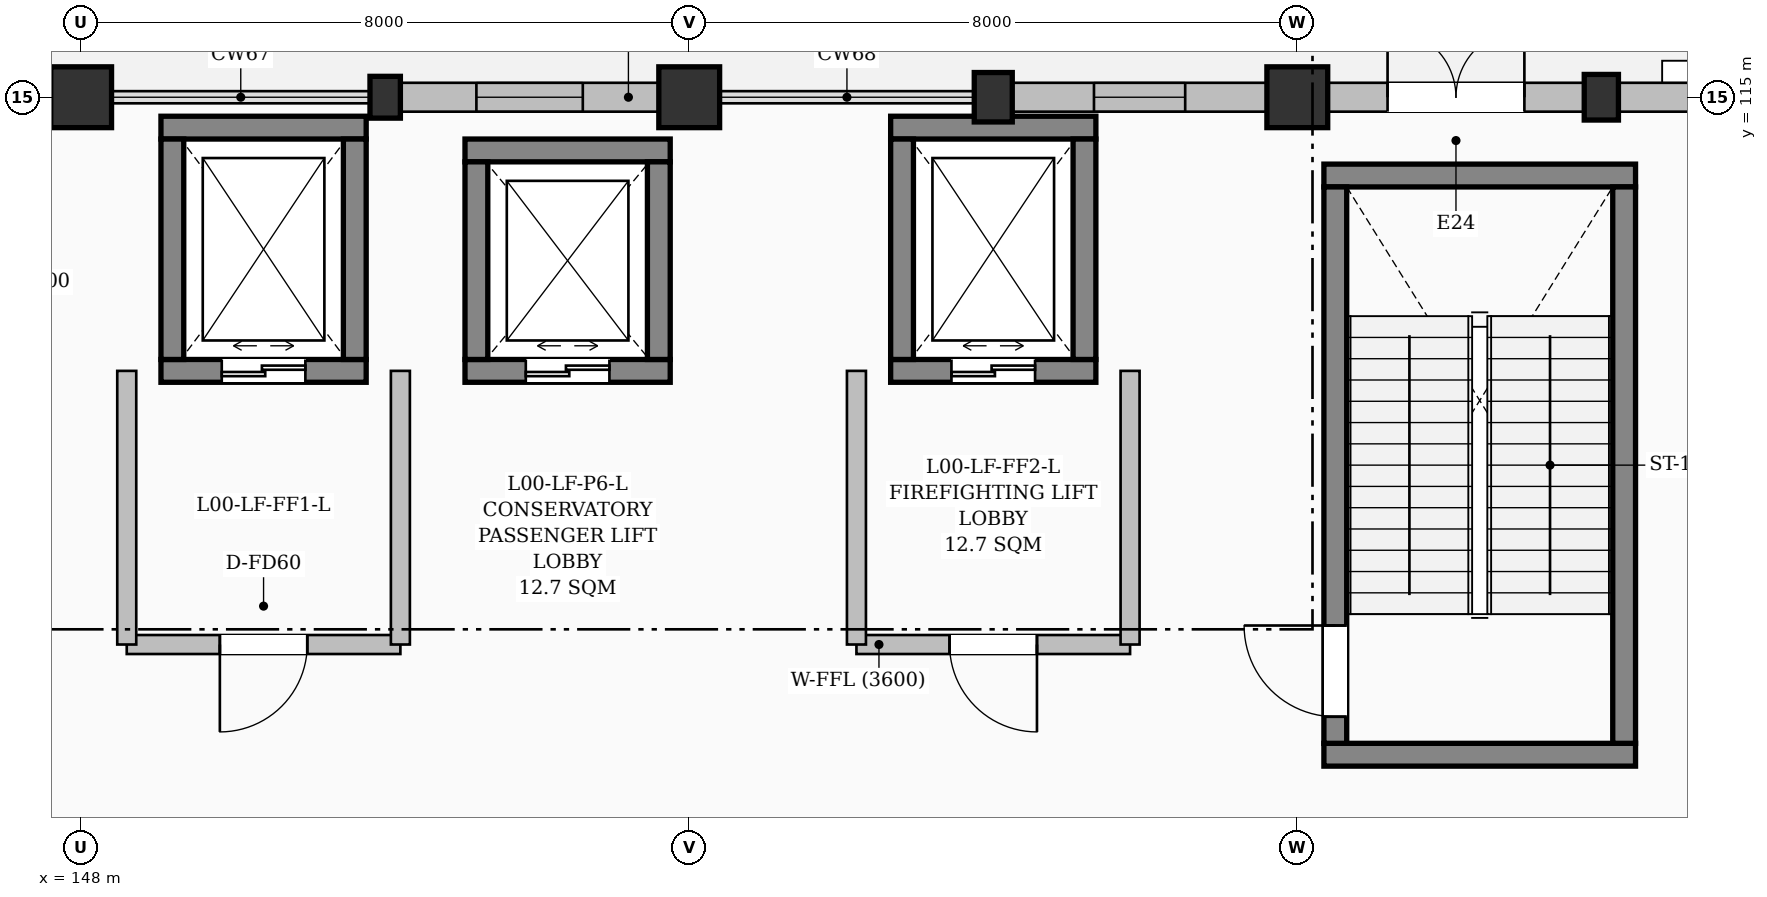
"""IFC4 building model, lengths in metres.
Left out: names, types, materials, properties, quantities, classifications, styles, units other than length and angle.
Written with IfcOpenShell. Run it as: python <this file> out.ifc"""

import sys

from ifc_helpers import new_model, si_unit, direction, frame, frame_2d, origin, origin_2d, place, context, subcontext, project, spatial, rectangle, extrude, element, fill, save


model = new_model("IFC4")
c1 = context("Model", 3, precision=1e-05, world=origin(), true_north=direction((0.0, 1.0)))
c2 = subcontext(c1, "Body", "Model", "MODEL_VIEW")
j1 = project(units=[si_unit("LENGTHUNIT", "METRE"), si_unit("PLANEANGLEUNIT", "RADIAN")], contexts=[c1])
p1 = place(None, origin())
s1 = spatial("IfcSite", under=j1, at=p1, CompositionType="ELEMENT")
p2 = place(p1, origin())
s2 = spatial("IfcBuilding", under=s1, at=p2, CompositionType="ELEMENT")
p3 = place(p2, origin())
s3 = spatial("IfcBuildingStorey", under=s2, at=p3, CompositionType="ELEMENT", Elevation=0.0)
p4 = place(p3, frame((148.0, 115.0, 0.0), z_axis=(0.0, 0.0, 1.0), x_axis=(1.0, 0.0, 0.0)))
e1 = element("IfcColumn", 1, at=p4, inside=s3, PredefinedType="COLUMN", context=c2, shape_type="SweptSolid", body=[
    extrude(rectangle(XDim=0.8, YDim=0.8, at=origin_2d()), origin(), (0.0, 0.0, 1.0), 4.8),
])
p5 = place(p3, frame((152.0, 115.0, 0.0), z_axis=(0.0, 0.0, 1.0), x_axis=(1.0, 0.0, 0.0)))
e2 = element("IfcColumn", 2, at=p5, inside=s3, PredefinedType="PILASTER", context=c2, shape_type="SweptSolid", body=[
    extrude(rectangle(XDim=0.4, YDim=0.55, at=origin_2d()), origin(), (0.0, 0.0, 1.0), 4.8),
])
p6 = place(p3, frame((156.0, 115.0, 0.0), z_axis=(0.0, 0.0, 1.0), x_axis=(1.0, 0.0, 0.0)))
e3 = element("IfcColumn", 3, at=p6, inside=s3, PredefinedType="COLUMN", context=c2, shape_type="SweptSolid", body=[
    extrude(rectangle(XDim=0.8, YDim=0.8, at=origin_2d()), origin(), (0.0, 0.0, 1.0), 4.8),
])
p7 = place(p3, frame((160.0, 115.0, 0.0), z_axis=(0.0, 0.0, 1.0), x_axis=(1.0, 0.0, 0.0)))
e4 = element("IfcColumn", 4, at=p7, inside=s3, PredefinedType="PILASTER", context=c2, shape_type="SweptSolid", body=[
    extrude(rectangle(XDim=0.5, YDim=0.65, at=origin_2d()), origin(), (0.0, 0.0, 1.0), 4.8),
])
p8 = place(p3, frame((164.0, 115.0, 0.0), z_axis=(0.0, 0.0, 1.0), x_axis=(1.0, 0.0, 0.0)))
e5 = element("IfcColumn", 5, at=p8, inside=s3, PredefinedType="COLUMN", context=c2, shape_type="SweptSolid", body=[
    extrude(rectangle(XDim=0.8, YDim=0.8, at=origin_2d()), origin(), (0.0, 0.0, 1.0), 4.8),
])
p9 = place(p3, frame((168.0, 115.0, 0.0), z_axis=(0.0, 0.0, 1.0), x_axis=(1.0, 0.0, 0.0)))
e6 = element("IfcColumn", 6, at=p9, inside=s3, PredefinedType="PILASTER", context=c2, shape_type="SweptSolid", body=[
    extrude(rectangle(XDim=0.45, YDim=0.6, at=origin_2d()), origin(), (0.0, 0.0, 1.0), 4.8),
])
p10 = place(p3, frame((152.2, 115.0, 0.0), z_axis=(0.0, 0.0, 1.0), x_axis=(1.0, 0.0, 0.0)))
e7 = element("IfcWall", 7, at=p10, inside=s3, PredefinedType="SOLIDWALL", context=c2, shape_type="SweptSolid", body=[
    extrude(rectangle(XDim=3.4, YDim=0.38, at=frame_2d((1.7, 0.0))), origin(), (0.0, 0.0, 1.0), 3.985),
])
p11 = place(p10, frame((1.0, 0.0, 0.95)))
e8 = element("IfcOpeningElement", 8, at=p11, cuts=e7, PredefinedType="OPENING", context=c2, shape_type="SweptSolid", body=[
    extrude(rectangle(XDim=1.4, YDim=1.8, at=frame_2d((0.7, 0.9))), frame((0.0, 0.2, 0.0), z_axis=(0.0, -1.0, 0.0), x_axis=(1.0, 0.0, 0.0)), (0.0, 0.0, 1.0), 0.4),
])
p12 = place(p3, frame((160.25, 115.0, 0.0), z_axis=(0.0, 0.0, 1.0), x_axis=(1.0, 0.0, 0.0)))
e9 = element("IfcWall", 9, at=p12, inside=s3, PredefinedType="SOLIDWALL", context=c2, shape_type="SweptSolid", body=[
    extrude(rectangle(XDim=3.35, YDim=0.38, at=frame_2d((1.675, 0.0))), origin(), (0.0, 0.0, 1.0), 3.935),
])
p13 = place(p12, frame((1.075, 0.0, 0.95)))
e10 = element("IfcOpeningElement", 10, at=p13, cuts=e9, PredefinedType="OPENING", context=c2, shape_type="SweptSolid", body=[
    extrude(rectangle(XDim=1.2, YDim=1.5, at=frame_2d((0.6, 0.75))), frame((0.0, 0.2, 0.0), z_axis=(0.0, -1.0, 0.0), x_axis=(1.0, 0.0, 0.0)), (0.0, 0.0, 1.0), 0.4),
])
p14 = place(p3, frame((164.4, 115.0, 0.0), z_axis=(0.0, 0.0, 1.0), x_axis=(1.0, 0.0, 0.0)))
e11 = element("IfcWall", 11, at=p14, inside=s3, PredefinedType="SOLIDWALL", context=c2, shape_type="SweptSolid", body=[
    extrude(rectangle(XDim=3.375, YDim=0.38, at=frame_2d((1.688, 0.0))), origin(), (0.0, 0.0, 1.0), 4.235),
])
p15 = place(p14, frame((0.788, 0.0, 0.0)))
e12 = element("IfcOpeningElement", 12, at=p15, cuts=e11, PredefinedType="OPENING", context=c2, shape_type="SweptSolid", body=[
    extrude(rectangle(XDim=1.8, YDim=2.25, at=frame_2d((0.9, 1.125))), frame((0.0, 0.2, 0.0), z_axis=(0.0, -1.0, 0.0), x_axis=(1.0, 0.0, 0.0)), (0.0, 0.0, 1.0), 0.4),
])
p16 = place(p3, frame((168.225, 115.0, 0.0), z_axis=(0.0, 0.0, 1.0), x_axis=(1.0, 0.0, 0.0)))
e13 = element("IfcWall", 13, at=p16, inside=s3, PredefinedType="SOLIDWALL", context=c2, shape_type="SweptSolid", body=[
    extrude(rectangle(XDim=3.375, YDim=0.38, at=frame_2d((1.688, 0.0))), origin(), (0.0, 0.0, 1.0), 4.235),
])
p17 = place(p16, frame((1.038, 0.0, 0.95)))
e14 = element("IfcOpeningElement", 14, at=p17, cuts=e13, PredefinedType="OPENING", context=c2, shape_type="SweptSolid", body=[
    extrude(rectangle(XDim=1.3, YDim=1.4, at=frame_2d((0.65, 0.7))), frame((0.0, 0.2, 0.0), z_axis=(0.0, -1.0, 0.0), x_axis=(1.0, 0.0, 0.0)), (0.0, 0.0, 1.0), 0.4),
])
for number, where, z_axis, x_axis in (
    (15, (164.35, 106.35, 0.0), (0.0, 0.0, 1.0), (1.0, 0.0, 0.0)),
    (16, (168.45, 113.97, 0.0), (0.0, 0.0, 1.0), (-1.0, 0.0, 0.0)),
):
    element("IfcWall", number, at=place(p3, frame(where, z_axis=z_axis, x_axis=x_axis)), inside=s3, PredefinedType="SHEAR", context=c2, shape_type="SweptSolid", body=[
        extrude(rectangle(XDim=4.1, YDim=0.3, at=frame_2d((2.05, 0.0))), origin(), (0.0, 0.0, 1.0), 4.55),
    ])
p18 = place(p3, frame((164.5, 106.5, 0.0), z_axis=(0.0, 0.0, 1.0), x_axis=(0.0, 1.0, 0.0)))
e17 = element("IfcWall", 17, at=p18, inside=s3, PredefinedType="SHEAR", context=c2, shape_type="SweptSolid", body=[
    extrude(rectangle(XDim=7.32, YDim=0.3, at=frame_2d((3.66, 0.0))), origin(), (0.0, 0.0, 1.0), 4.55),
])
p19 = place(p18, frame((0.35, 0.0, 0.0)))
e18 = element("IfcOpeningElement", 18, at=p19, cuts=e17, PredefinedType="OPENING", context=c2, shape_type="SweptSolid", body=[
    extrude(rectangle(XDim=1.2, YDim=2.15, at=frame_2d((0.6, 1.075))), frame((0.0, 0.16, 0.0), z_axis=(0.0, -1.0, 0.0), x_axis=(1.0, 0.0, 0.0)), (0.0, 0.0, 1.0), 0.32),
])
p20 = place(p3, frame((168.3, 113.82, 0.0), z_axis=(0.0, 0.0, 1.0), x_axis=(0.0, -1.0, 0.0)))
e19 = element("IfcWall", 19, at=p20, inside=s3, PredefinedType="SHEAR", context=c2, shape_type="SweptSolid", body=[
    extrude(rectangle(XDim=7.32, YDim=0.3, at=frame_2d((3.66, 0.0))), origin(), (0.0, 0.0, 1.0), 4.55),
])
p21 = place(p3, frame((149.05, 111.4, 0.0), z_axis=(0.0, 0.0, 1.0), x_axis=(1.0, 0.0, 0.0)))
e20 = element("IfcWall", 20, at=p21, inside=s3, PredefinedType="SHEAR", context=c2, shape_type="SweptSolid", body=[
    extrude(rectangle(XDim=2.7, YDim=0.3, at=frame_2d((1.35, 0.0))), origin(), (0.0, 0.0, 1.0), 4.55),
])
p22 = place(p21, frame((0.8, 0.0, 0.0)))
e21 = element("IfcOpeningElement", 21, at=p22, cuts=e20, PredefinedType="OPENING", context=c2, shape_type="SweptSolid", body=[
    extrude(rectangle(XDim=1.1, YDim=2.15, at=frame_2d((0.55, 1.075))), frame((0.0, 0.16, 0.0), z_axis=(0.0, -1.0, 0.0), x_axis=(1.0, 0.0, 0.0)), (0.0, 0.0, 1.0), 0.32),
])
p23 = place(p3, frame((151.75, 114.6, 0.0), z_axis=(0.0, 0.0, 1.0), x_axis=(-1.0, 0.0, 0.0)))
e22 = element("IfcWall", 22, at=p23, inside=s3, PredefinedType="SHEAR", context=c2, shape_type="SweptSolid", body=[
    extrude(rectangle(XDim=2.7, YDim=0.3, at=frame_2d((1.35, 0.0))), origin(), (0.0, 0.0, 1.0), 4.55),
])
for number, where, z_axis, x_axis in (
    (23, (149.2, 111.55, 0.0), (0.0, 0.0, 1.0), (0.0, 1.0, 0.0)),
    (24, (151.6, 114.45, 0.0), (0.0, 0.0, 1.0), (0.0, -1.0, 0.0)),
):
    element("IfcWall", number, at=place(p3, frame(where, z_axis=z_axis, x_axis=x_axis)), inside=s3, PredefinedType="SHEAR", context=c2, shape_type="SweptSolid", body=[
        extrude(rectangle(XDim=2.9, YDim=0.3, at=frame_2d((1.45, 0.0))), origin(), (0.0, 0.0, 1.0), 4.55),
    ])
p24 = place(p3, frame((152.2, 107.8, 0.0), z_axis=(0.0, 0.0, 1.0), x_axis=(-1.0, 0.0, 0.0)))
e25 = element("IfcWall", 25, at=p24, inside=s3, PredefinedType="SOLIDWALL", context=c2, shape_type="SweptSolid", body=[
    extrude(rectangle(XDim=3.6, YDim=0.25, at=frame_2d((1.8, 0.0))), origin(), (0.0, 0.0, 1.0), 4.55),
])
p25 = place(p24, frame((1.225, 0.0, 0.0)))
e26 = element("IfcOpeningElement", 26, at=p25, cuts=e25, PredefinedType="OPENING", context=c2, shape_type="SweptSolid", body=[
    extrude(rectangle(XDim=1.15, YDim=2.15, at=frame_2d((0.575, 1.075))), frame((0.0, 0.135, 0.0), z_axis=(0.0, -1.0, 0.0), x_axis=(1.0, 0.0, 0.0)), (0.0, 0.0, 1.0), 0.27),
])
for number, where, z_axis, x_axis in (
    (27, (148.6, 107.8, 0.0), (0.0, 0.0, 1.0), (0.0, 1.0, 0.0)),
    (28, (152.2, 111.4, 0.0), (0.0, 0.0, 1.0), (0.0, -1.0, 0.0)),
):
    element("IfcWall", number, at=place(p3, frame(where, z_axis=z_axis, x_axis=x_axis)), inside=s3, PredefinedType="SOLIDWALL", context=c2, shape_type="SweptSolid", body=[
        extrude(rectangle(XDim=3.6, YDim=0.25, at=frame_2d((1.8, 0.0))), origin(), (0.0, 0.0, 1.0), 4.55),
    ])
p26 = place(p3, frame((158.65, 111.4, 0.0), z_axis=(0.0, 0.0, 1.0), x_axis=(1.0, 0.0, 0.0)))
e29 = element("IfcWall", 29, at=p26, inside=s3, PredefinedType="SHEAR", context=c2, shape_type="SweptSolid", body=[
    extrude(rectangle(XDim=2.7, YDim=0.3, at=frame_2d((1.35, 0.0))), origin(), (0.0, 0.0, 1.0), 4.55),
])
p27 = place(p26, frame((0.8, 0.0, 0.0)))
e30 = element("IfcOpeningElement", 30, at=p27, cuts=e29, PredefinedType="OPENING", context=c2, shape_type="SweptSolid", body=[
    extrude(rectangle(XDim=1.1, YDim=2.15, at=frame_2d((0.55, 1.075))), frame((0.0, 0.16, 0.0), z_axis=(0.0, -1.0, 0.0), x_axis=(1.0, 0.0, 0.0)), (0.0, 0.0, 1.0), 0.32),
])
p28 = place(p3, frame((161.35, 114.6, 0.0), z_axis=(0.0, 0.0, 1.0), x_axis=(-1.0, 0.0, 0.0)))
e31 = element("IfcWall", 31, at=p28, inside=s3, PredefinedType="SHEAR", context=c2, shape_type="SweptSolid", body=[
    extrude(rectangle(XDim=2.7, YDim=0.3, at=frame_2d((1.35, 0.0))), origin(), (0.0, 0.0, 1.0), 4.55),
])
for number, where, z_axis, x_axis in (
    (32, (158.8, 111.55, 0.0), (0.0, 0.0, 1.0), (0.0, 1.0, 0.0)),
    (33, (161.2, 114.45, 0.0), (0.0, 0.0, 1.0), (0.0, -1.0, 0.0)),
):
    element("IfcWall", number, at=place(p3, frame(where, z_axis=z_axis, x_axis=x_axis)), inside=s3, PredefinedType="SHEAR", context=c2, shape_type="SweptSolid", body=[
        extrude(rectangle(XDim=2.9, YDim=0.3, at=frame_2d((1.45, 0.0))), origin(), (0.0, 0.0, 1.0), 4.55),
    ])
p29 = place(p3, frame((161.8, 107.8, 0.0), z_axis=(0.0, 0.0, 1.0), x_axis=(-1.0, 0.0, 0.0)))
e34 = element("IfcWall", 34, at=p29, inside=s3, PredefinedType="SOLIDWALL", context=c2, shape_type="SweptSolid", body=[
    extrude(rectangle(XDim=3.6, YDim=0.25, at=frame_2d((1.8, 0.0))), origin(), (0.0, 0.0, 1.0), 4.55),
])
p30 = place(p29, frame((1.225, 0.0, 0.0)))
e35 = element("IfcOpeningElement", 35, at=p30, cuts=e34, PredefinedType="OPENING", context=c2, shape_type="SweptSolid", body=[
    extrude(rectangle(XDim=1.15, YDim=2.15, at=frame_2d((0.575, 1.075))), frame((0.0, 0.135, 0.0), z_axis=(0.0, -1.0, 0.0), x_axis=(1.0, 0.0, 0.0)), (0.0, 0.0, 1.0), 0.27),
])
for number, where, z_axis, x_axis in (
    (36, (158.2, 107.8, 0.0), (0.0, 0.0, 1.0), (0.0, 1.0, 0.0)),
    (37, (161.8, 111.4, 0.0), (0.0, 0.0, 1.0), (0.0, -1.0, 0.0)),
):
    element("IfcWall", number, at=place(p3, frame(where, z_axis=z_axis, x_axis=x_axis)), inside=s3, PredefinedType="SOLIDWALL", context=c2, shape_type="SweptSolid", body=[
        extrude(rectangle(XDim=3.6, YDim=0.25, at=frame_2d((1.8, 0.0))), origin(), (0.0, 0.0, 1.0), 4.55),
    ])
p31 = place(p3, frame((153.05, 111.4, 0.0), z_axis=(0.0, 0.0, 1.0), x_axis=(1.0, 0.0, 0.0)))
e38 = element("IfcWall", 38, at=p31, inside=s3, PredefinedType="SHEAR", context=c2, shape_type="SweptSolid", body=[
    extrude(rectangle(XDim=2.7, YDim=0.3, at=frame_2d((1.35, 0.0))), origin(), (0.0, 0.0, 1.0), 4.55),
])
p32 = place(p31, frame((0.8, 0.0, 0.0)))
e39 = element("IfcOpeningElement", 39, at=p32, cuts=e38, PredefinedType="OPENING", context=c2, shape_type="SweptSolid", body=[
    extrude(rectangle(XDim=1.1, YDim=2.15, at=frame_2d((0.55, 1.075))), frame((0.0, 0.16, 0.0), z_axis=(0.0, -1.0, 0.0), x_axis=(1.0, 0.0, 0.0)), (0.0, 0.0, 1.0), 0.32),
])
p33 = place(p3, frame((155.75, 114.3, 0.0), z_axis=(0.0, 0.0, 1.0), x_axis=(-1.0, 0.0, 0.0)))
e40 = element("IfcWall", 40, at=p33, inside=s3, PredefinedType="SHEAR", context=c2, shape_type="SweptSolid", body=[
    extrude(rectangle(XDim=2.7, YDim=0.3, at=frame_2d((1.35, 0.0))), origin(), (0.0, 0.0, 1.0), 4.55),
])
for number, where, z_axis, x_axis in (
    (41, (153.2, 111.55, 0.0), (0.0, 0.0, 1.0), (0.0, 1.0, 0.0)),
    (42, (155.6, 114.15, 0.0), (0.0, 0.0, 1.0), (0.0, -1.0, 0.0)),
):
    element("IfcWall", number, at=place(p3, frame(where, z_axis=z_axis, x_axis=x_axis)), inside=s3, PredefinedType="SHEAR", context=c2, shape_type="SweptSolid", body=[
        extrude(rectangle(XDim=2.6, YDim=0.3, at=frame_2d((1.3, 0.0))), origin(), (0.0, 0.0, 1.0), 4.55),
    ])
p34 = place(p11, origin())
e43 = element("IfcWindow", 43, at=p34, inside=s3, PartitioningType="DOUBLE_PANEL_VERTICAL", PredefinedType="WINDOW", context=c2, shape_type="SweptSolid", body=[
    extrude(rectangle(XDim=1.4, YDim=1.8, at=frame_2d((0.7, 0.9))), frame((0.0, 0.03, 0.0), z_axis=(0.0, -1.0, 0.0), x_axis=(1.0, 0.0, 0.0)), (0.0, 0.0, 1.0), 0.06),
])
fill(e8, e43)
p35 = place(p13, origin())
e44 = element("IfcWindow", 44, at=p35, inside=s3, PartitioningType="SINGLE_PANEL", PredefinedType="WINDOW", context=c2, shape_type="SweptSolid", body=[
    extrude(rectangle(XDim=1.2, YDim=1.5, at=frame_2d((0.6, 0.75))), frame((0.0, 0.03, 0.0), z_axis=(0.0, -1.0, 0.0), x_axis=(1.0, 0.0, 0.0)), (0.0, 0.0, 1.0), 0.06),
])
fill(e10, e44)
p36 = place(p15, origin())
e45 = element("IfcDoor", 45, at=p36, inside=s3, OperationType="DOUBLE_DOOR_SINGLE_SWING", PredefinedType="DOOR", context=c2, shape_type="SweptSolid", body=[
    extrude(rectangle(XDim=1.8, YDim=2.25, at=frame_2d((0.9, 1.125))), frame((0.0, 0.025, 0.0), z_axis=(0.0, -1.0, 0.0), x_axis=(1.0, 0.0, 0.0)), (0.0, 0.0, 1.0), 0.05),
])
fill(e12, e45)
p37 = place(p19, origin())
e46 = element("IfcDoor", 46, at=p37, inside=s3, OperationType="SINGLE_SWING_RIGHT", PredefinedType="DOOR", context=c2, shape_type="SweptSolid", body=[
    extrude(rectangle(XDim=1.2, YDim=2.15, at=frame_2d((0.6, 1.075))), frame((0.0, 0.025, 0.0), z_axis=(0.0, -1.0, 0.0), x_axis=(1.0, 0.0, 0.0)), (0.0, 0.0, 1.0), 0.05),
])
fill(e18, e46)
p38 = place(p22, origin())
e47 = element("IfcDoor", 47, at=p38, inside=s3, OperationType="DOUBLE_DOOR_SLIDING", PredefinedType="DOOR", context=c2, shape_type="SweptSolid", body=[
    extrude(rectangle(XDim=1.1, YDim=2.15, at=frame_2d((0.55, 1.075))), frame((0.0, 0.025, 0.0), z_axis=(0.0, -1.0, 0.0), x_axis=(1.0, 0.0, 0.0)), (0.0, 0.0, 1.0), 0.05),
])
fill(e21, e47)
p39 = place(p25, origin())
e48 = element("IfcDoor", 48, at=p39, inside=s3, OperationType="SINGLE_SWING_RIGHT", PredefinedType="DOOR", context=c2, shape_type="SweptSolid", body=[
    extrude(rectangle(XDim=1.15, YDim=2.15, at=frame_2d((0.575, 1.075))), frame((0.0, 0.025, 0.0), z_axis=(0.0, -1.0, 0.0), x_axis=(1.0, 0.0, 0.0)), (0.0, 0.0, 1.0), 0.05),
])
fill(e26, e48)
p40 = place(p27, origin())
e49 = element("IfcDoor", 49, at=p40, inside=s3, OperationType="DOUBLE_DOOR_SLIDING", PredefinedType="DOOR", context=c2, shape_type="SweptSolid", body=[
    extrude(rectangle(XDim=1.1, YDim=2.15, at=frame_2d((0.55, 1.075))), frame((0.0, 0.025, 0.0), z_axis=(0.0, -1.0, 0.0), x_axis=(1.0, 0.0, 0.0)), (0.0, 0.0, 1.0), 0.05),
])
fill(e30, e49)
p41 = place(p30, origin())
e50 = element("IfcDoor", 50, at=p41, inside=s3, OperationType="SINGLE_SWING_LEFT", PredefinedType="DOOR", context=c2, shape_type="SweptSolid", body=[
    extrude(rectangle(XDim=1.15, YDim=2.15, at=frame_2d((0.575, 1.075))), frame((0.0, 0.025, 0.0), z_axis=(0.0, -1.0, 0.0), x_axis=(1.0, 0.0, 0.0)), (0.0, 0.0, 1.0), 0.05),
])
fill(e35, e50)
p42 = place(p32, origin())
e51 = element("IfcDoor", 51, at=p42, inside=s3, OperationType="DOUBLE_DOOR_SLIDING", PredefinedType="DOOR", context=c2, shape_type="SweptSolid", body=[
    extrude(rectangle(XDim=1.1, YDim=2.15, at=frame_2d((0.55, 1.075))), frame((0.0, 0.025, 0.0), z_axis=(0.0, -1.0, 0.0), x_axis=(1.0, 0.0, 0.0)), (0.0, 0.0, 1.0), 0.05),
])
fill(e39, e51)
save(model, sys.argv[1])
